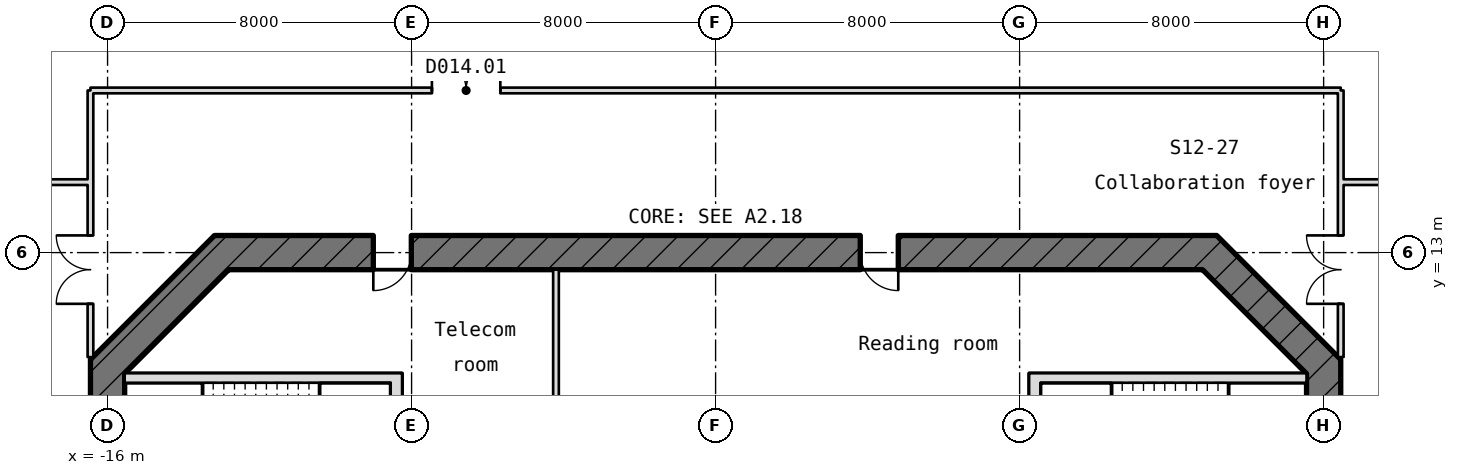
"""IFC4 building model, lengths in metres.
Left out: names, types, materials, properties, quantities, classifications, styles, units other than length and angle.
Written with IfcOpenShell. Run it as: python <this file> out.ifc"""

import sys

from ifc_helpers import new_model, si_unit, direction, frame, frame_2d, origin, place, context, subcontext, project, spatial, rectangle, extrude, element, fill, save


model = new_model("IFC4")
c1 = context("Model", 3, precision=1e-05, world=origin(), true_north=direction((0.0, 1.0)))
c2 = subcontext(c1, "Body", "Model", "MODEL_VIEW")
j1 = project(units=[si_unit("LENGTHUNIT", "METRE"), si_unit("PLANEANGLEUNIT", "RADIAN")], contexts=[c1])
p1 = place(None, origin())
s1 = spatial("IfcSite", under=j1, at=p1, CompositionType="ELEMENT")
p2 = place(p1, origin())
s2 = spatial("IfcBuilding", under=s1, at=p2, CompositionType="ELEMENT")
p3 = place(p2, frame((0.0, 0.0, 185.95)))
s3 = spatial("IfcBuildingStorey", under=s2, at=p3, CompositionType="ELEMENT", Elevation=185.95)
p4 = place(p3, frame((-15.987, 21.734, 0.0), z_axis=(0.0, 0.0, 1.0), x_axis=(-0.766082233378, -0.642742570321, 0.0)))
e1 = element("IfcWall", 1, at=p4, inside=s3, PredefinedType="SOLIDWALL", context=c2, shape_type="SweptSolid", body=[
    extrude(rectangle(XDim=11.53, YDim=0.3, at=frame_2d((5.765, 0.0))), origin(), (0.0, 0.0, 1.0), 3.97),
])
p5 = place(p4, frame((7.83, 0.0, 0.0)))
e2 = element("IfcOpeningElement", 2, at=p5, cuts=e1, PredefinedType="OPENING", context=c2, shape_type="SweptSolid", body=[
    extrude(rectangle(XDim=1.8, YDim=2.4, at=frame_2d((0.9, 1.2))), frame((0.0, 0.16, 0.0), z_axis=(0.0, -1.0, 0.0), x_axis=(1.0, 0.0, 0.0)), (0.0, 0.0, 1.0), 0.32),
])
p6 = place(p4, frame((5.23, 0.0, 0.9)))
e3 = element("IfcOpeningElement", 3, at=p6, cuts=e1, PredefinedType="OPENING", context=c2, shape_type="SweptSolid", body=[
    extrude(rectangle(XDim=2.0, YDim=1.5, at=frame_2d((1.0, 0.75))), frame((0.0, 0.16, 0.0), z_axis=(0.0, -1.0, 0.0), x_axis=(1.0, 0.0, 0.0)), (0.0, 0.0, 1.0), 0.32),
])
p7 = place(p3, frame((16.0, -10.186, -0.18), z_axis=(0.0, 0.0, 1.0), x_axis=(0.0, 1.0, 0.0)))
e4 = element("IfcWall", 4, at=p7, inside=s3, PredefinedType="SHEAR", context=c2, shape_type="SweptSolid", body=[
    extrude(rectangle(XDim=20.373, YDim=0.9, at=frame_2d((10.186, 0.0))), origin(), (0.0, 0.0, 1.0), 4.15),
])
p8 = place(p7, frame((8.986, 0.0, 0.18)))
e5 = element("IfcOpeningElement", 5, at=p8, cuts=e4, PredefinedType="OPENING", context=c2, shape_type="SweptSolid", body=[
    extrude(rectangle(XDim=2.4, YDim=2.1, at=frame_2d((1.2, 1.05))), frame((0.0, 0.46, 0.0), z_axis=(0.0, -1.0, 0.0), x_axis=(1.0, 0.0, 0.0)), (0.0, 0.0, 1.0), 0.92),
])
p9 = place(p7, frame((13.586, 0.0, 0.18)))
e6 = element("IfcOpeningElement", 6, at=p9, cuts=e4, PredefinedType="OPENING", context=c2, shape_type="SweptSolid", body=[
    extrude(rectangle(XDim=1.2, YDim=2.1, at=frame_2d((0.6, 1.05))), frame((0.0, 0.46, 0.0), z_axis=(0.0, -1.0, 0.0), x_axis=(1.0, 0.0, 0.0)), (0.0, 0.0, 1.0), 0.92),
])
p10 = place(p7, frame((2.4, 0.0, 0.18)))
e7 = element("IfcOpeningElement", 7, at=p10, cuts=e4, PredefinedType="OPENING", context=c2, shape_type="SweptSolid", body=[
    extrude(rectangle(XDim=1.2, YDim=2.1, at=frame_2d((0.6, 1.05))), frame((0.0, 0.46, 0.0), z_axis=(0.0, -1.0, 0.0), x_axis=(1.0, 0.0, 0.0)), (0.0, 0.0, 1.0), 0.92),
])
p11 = place(p3, frame((16.132, 9.868, -0.18), z_axis=(0.0, 0.0, 1.0), x_axis=(-0.707106781187, 0.707106781187, 0.0)))
e8 = element("IfcWall", 8, at=p11, inside=s3, PredefinedType="SHEAR", context=c2, shape_type="SweptSolid", body=[
    extrude(rectangle(XDim=4.615, YDim=0.9, at=frame_2d((2.308, 0.0))), origin(), (0.0, 0.0, 1.0), 4.15),
])
p12 = place(p3, frame((13.186, 13.0, -0.18), z_axis=(0.0, 0.0, 1.0), x_axis=(-1.0, 0.0, 0.0)))
e9 = element("IfcWall", 9, at=p12, inside=s3, PredefinedType="SHEAR", context=c2, shape_type="SweptSolid", body=[
    extrude(rectangle(XDim=26.373, YDim=0.9, at=frame_2d((13.186, 0.0))), origin(), (0.0, 0.0, 1.0), 4.15),
])
p13 = place(p12, frame((21.193, 0.0, 0.18)))
e10 = element("IfcOpeningElement", 10, at=p13, cuts=e9, PredefinedType="OPENING", context=c2, shape_type="SweptSolid", body=[
    extrude(rectangle(XDim=1.0, YDim=2.1, at=frame_2d((0.5, 1.05))), frame((0.0, 0.46, 0.0), z_axis=(0.0, -1.0, 0.0), x_axis=(1.0, 0.0, 0.0)), (0.0, 0.0, 1.0), 0.92),
])
p14 = place(p12, frame((8.379, 0.0, 0.18)))
e11 = element("IfcOpeningElement", 11, at=p14, cuts=e9, PredefinedType="OPENING", context=c2, shape_type="SweptSolid", body=[
    extrude(rectangle(XDim=1.0, YDim=2.1, at=frame_2d((0.5, 1.05))), frame((0.0, 0.46, 0.0), z_axis=(0.0, -1.0, 0.0), x_axis=(1.0, 0.0, 0.0)), (0.0, 0.0, 1.0), 0.92),
])
p15 = place(p3, frame((-12.868, 13.132, -0.18), z_axis=(0.0, 0.0, 1.0), x_axis=(-0.707106781187, -0.707106781187, 0.0)))
e12 = element("IfcWall", 12, at=p15, inside=s3, PredefinedType="SHEAR", context=c2, shape_type="SweptSolid", body=[
    extrude(rectangle(XDim=4.615, YDim=0.9, at=frame_2d((2.308, 0.0))), origin(), (0.0, 0.0, 1.0), 4.15),
])
p16 = place(p3, frame((-16.0, 10.186, -0.18), z_axis=(0.0, 0.0, 1.0), x_axis=(0.0, -1.0, 0.0)))
e13 = element("IfcWall", 13, at=p16, inside=s3, PredefinedType="SHEAR", context=c2, shape_type="SweptSolid", body=[
    extrude(rectangle(XDim=20.373, YDim=0.9, at=frame_2d((10.186, 0.0))), origin(), (0.0, 0.0, 1.0), 4.15),
])
p17 = place(p16, frame((8.986, 0.0, 0.18)))
e14 = element("IfcOpeningElement", 14, at=p17, cuts=e13, PredefinedType="OPENING", context=c2, shape_type="SweptSolid", body=[
    extrude(rectangle(XDim=2.4, YDim=2.1, at=frame_2d((1.2, 1.05))), frame((0.0, 0.46, 0.0), z_axis=(0.0, -1.0, 0.0), x_axis=(1.0, 0.0, 0.0)), (0.0, 0.0, 1.0), 0.92),
])
p18 = place(p16, frame((5.586, 0.0, 0.18)))
e15 = element("IfcOpeningElement", 15, at=p18, cuts=e13, PredefinedType="OPENING", context=c2, shape_type="SweptSolid", body=[
    extrude(rectangle(XDim=1.2, YDim=2.1, at=frame_2d((0.6, 1.05))), frame((0.0, 0.46, 0.0), z_axis=(0.0, -1.0, 0.0), x_axis=(1.0, 0.0, 0.0)), (0.0, 0.0, 1.0), 0.92),
])
for number, where, z_axis, x_axis in (
    (16, (-15.55, 9.7, -0.18), (0.0, 0.0, 1.0), (1.0, 0.0, 0.0)),
    (17, (8.55, 9.7, -0.18), (0.0, 0.0, 1.0), (1.0, 0.0, 0.0)),
):
    element("IfcWall", number, at=place(p3, frame(where, z_axis=z_axis, x_axis=x_axis)), inside=s3, PredefinedType="SHEAR", context=c2, shape_type="SweptSolid", body=[
        extrude(rectangle(XDim=7.0, YDim=0.25, at=frame_2d((3.5, 0.0))), origin(), (0.0, 0.0, 1.0), 4.15),
    ])
p19 = place(p3, frame((-8.4, 8.35, -0.18), z_axis=(0.0, 0.0, 1.0), x_axis=(0.0, 1.0, 0.0)))
e18 = element("IfcWall", 18, at=p19, inside=s3, PredefinedType="SHEAR", context=c2, shape_type="SweptSolid", body=[
    extrude(rectangle(XDim=1.475, YDim=0.3, at=frame_2d((0.737, 0.0))), origin(), (0.0, 0.0, 1.0), 4.15),
])
p20 = place(p3, frame((-4.2, 8.46, 0.0), z_axis=(0.0, 0.0, 1.0), x_axis=(0.0, 1.0, 0.0)))
e19 = element("IfcWall", 19, at=p20, inside=s3, PredefinedType="PARTITIONING", context=c2, shape_type="SweptSolid", body=[
    extrude(rectangle(XDim=4.09, YDim=0.15, at=frame_2d((2.045, 0.0))), origin(), (0.0, 0.0, 1.0), 3.97),
])
p21 = place(p3, frame((8.4, 8.35, -0.18), z_axis=(0.0, 0.0, 1.0), x_axis=(0.0, 1.0, 0.0)))
e20 = element("IfcWall", 20, at=p21, inside=s3, PredefinedType="SHEAR", context=c2, shape_type="SweptSolid", body=[
    extrude(rectangle(XDim=1.475, YDim=0.3, at=frame_2d((0.737, 0.0))), origin(), (0.0, 0.0, 1.0), 4.15),
])
p22 = place(p3, frame((-19.15, 14.854, 0.0), z_axis=(0.0, 0.0, 1.0), x_axis=(1.0, 0.0, 0.0)))
e21 = element("IfcWall", 21, at=p22, inside=s3, PredefinedType="PARTITIONING", context=c2, shape_type="SweptSolid", body=[
    extrude(rectangle(XDim=2.7, YDim=0.15, at=frame_2d((1.35, 0.0))), origin(), (0.0, 0.0, 1.0), 3.97),
])
p23 = place(p3, frame((-16.45, 10.25, 0.0), z_axis=(0.0, 0.0, 1.0), x_axis=(0.0, 1.0, 0.0)))
e22 = element("IfcWall", 22, at=p23, inside=s3, PredefinedType="PARTITIONING", context=c2, shape_type="SweptSolid", body=[
    extrude(rectangle(XDim=7.016, YDim=0.15, at=frame_2d((3.508, 0.0))), origin(), (0.0, 0.0, 1.0), 3.97),
])
p24 = place(p23, frame((1.402, 0.0, 0.0)))
e23 = element("IfcOpeningElement", 23, at=p24, cuts=e22, PredefinedType="OPENING", context=c2, shape_type="SweptSolid", body=[
    extrude(rectangle(XDim=1.8, YDim=2.1, at=frame_2d((0.9, 1.05))), frame((0.0, 0.085, 0.0), z_axis=(0.0, -1.0, 0.0), x_axis=(1.0, 0.0, 0.0)), (0.0, 0.0, 1.0), 0.17),
])
p25 = place(p3, frame((-16.45, 17.266, 0.0), z_axis=(0.0, 0.0, 1.0), x_axis=(1.0, 0.0, 0.0)))
e24 = element("IfcWall", 24, at=p25, inside=s3, PredefinedType="PARTITIONING", context=c2, shape_type="SweptSolid", body=[
    extrude(rectangle(XDim=32.9, YDim=0.15, at=frame_2d((16.45, 0.0))), origin(), (0.0, 0.0, 1.0), 3.97),
])
p26 = place(p25, frame((8.985, 0.0, 0.0)))
e25 = element("IfcOpeningElement", 25, at=p26, cuts=e24, PredefinedType="OPENING", context=c2, shape_type="SweptSolid", body=[
    extrude(rectangle(XDim=1.8, YDim=2.1, at=frame_2d((0.9, 1.05))), frame((0.0, 0.085, 0.0), z_axis=(0.0, -1.0, 0.0), x_axis=(1.0, 0.0, 0.0)), (0.0, 0.0, 1.0), 0.17),
])
p27 = place(p3, frame((16.45, 10.25, 0.0), z_axis=(0.0, 0.0, 1.0), x_axis=(0.0, 1.0, 0.0)))
e26 = element("IfcWall", 26, at=p27, inside=s3, PredefinedType="PARTITIONING", context=c2, shape_type="SweptSolid", body=[
    extrude(rectangle(XDim=7.016, YDim=0.15, at=frame_2d((3.508, 0.0))), origin(), (0.0, 0.0, 1.0), 3.97),
])
p28 = place(p27, frame((1.402, 0.0, 0.0)))
e27 = element("IfcOpeningElement", 27, at=p28, cuts=e26, PredefinedType="OPENING", context=c2, shape_type="SweptSolid", body=[
    extrude(rectangle(XDim=1.8, YDim=2.1, at=frame_2d((0.9, 1.05))), frame((0.0, 0.085, 0.0), z_axis=(0.0, -1.0, 0.0), x_axis=(1.0, 0.0, 0.0)), (0.0, 0.0, 1.0), 0.17),
])
p29 = place(p3, frame((16.45, 14.854, 0.0), z_axis=(0.0, 0.0, 1.0), x_axis=(1.0, 0.0, 0.0)))
e28 = element("IfcWall", 28, at=p29, inside=s3, PredefinedType="PARTITIONING", context=c2, shape_type="SweptSolid", body=[
    extrude(rectangle(XDim=2.7, YDim=0.15, at=frame_2d((1.35, 0.0))), origin(), (0.0, 0.0, 1.0), 3.97),
])
p30 = place(p13, origin())
e29 = element("IfcDoor", 29, at=p30, inside=s3, OperationType="SINGLE_SWING_RIGHT", PredefinedType="DOOR", context=c2, shape_type="SweptSolid", body=[
    extrude(rectangle(XDim=1.0, YDim=2.1, at=frame_2d((0.5, 1.05))), frame((0.0, 0.025, 0.0), z_axis=(0.0, -1.0, 0.0), x_axis=(1.0, 0.0, 0.0)), (0.0, 0.0, 1.0), 0.05),
])
fill(e10, e29)
p31 = place(p14, origin())
e30 = element("IfcDoor", 30, at=p31, inside=s3, OperationType="SINGLE_SWING_RIGHT", PredefinedType="DOOR", context=c2, shape_type="SweptSolid", body=[
    extrude(rectangle(XDim=1.0, YDim=2.1, at=frame_2d((0.5, 1.05))), frame((0.0, 0.025, 0.0), z_axis=(0.0, -1.0, 0.0), x_axis=(1.0, 0.0, 0.0)), (0.0, 0.0, 1.0), 0.05),
])
fill(e11, e30)
p32 = place(p26, origin())
e31 = element("IfcDoor", 31, at=p32, inside=s3, OperationType="DOUBLE_DOOR_SINGLE_SWING", PredefinedType="DOOR", context=c2, shape_type="SweptSolid", body=[
    extrude(rectangle(XDim=1.8, YDim=2.1, at=frame_2d((0.9, 1.05))), frame((0.0, 0.025, 0.0), z_axis=(0.0, -1.0, 0.0), x_axis=(1.0, 0.0, 0.0)), (0.0, 0.0, 1.0), 0.05),
])
fill(e25, e31)
p33 = place(p24, origin())
e32 = element("IfcDoor", 32, at=p33, inside=s3, OperationType="DOUBLE_DOOR_SINGLE_SWING", PredefinedType="DOOR", context=c2, shape_type="SweptSolid", body=[
    extrude(rectangle(XDim=1.8, YDim=2.1, at=frame_2d((0.9, 1.05))), frame((0.0, 0.025, 0.0), z_axis=(0.0, -1.0, 0.0), x_axis=(1.0, 0.0, 0.0)), (0.0, 0.0, 1.0), 0.05),
])
fill(e23, e32)
p34 = place(p28, origin())
e33 = element("IfcDoor", 33, at=p34, inside=s3, OperationType="DOUBLE_DOOR_SINGLE_SWING", PredefinedType="DOOR", context=c2, shape_type="SweptSolid", body=[
    extrude(rectangle(XDim=1.8, YDim=2.1, at=frame_2d((0.9, 1.05))), frame((0.0, 0.025, 0.0), z_axis=(0.0, -1.0, 0.0), x_axis=(1.0, 0.0, 0.0)), (0.0, 0.0, 1.0), 0.05),
])
fill(e27, e33)
save(model, sys.argv[1])
